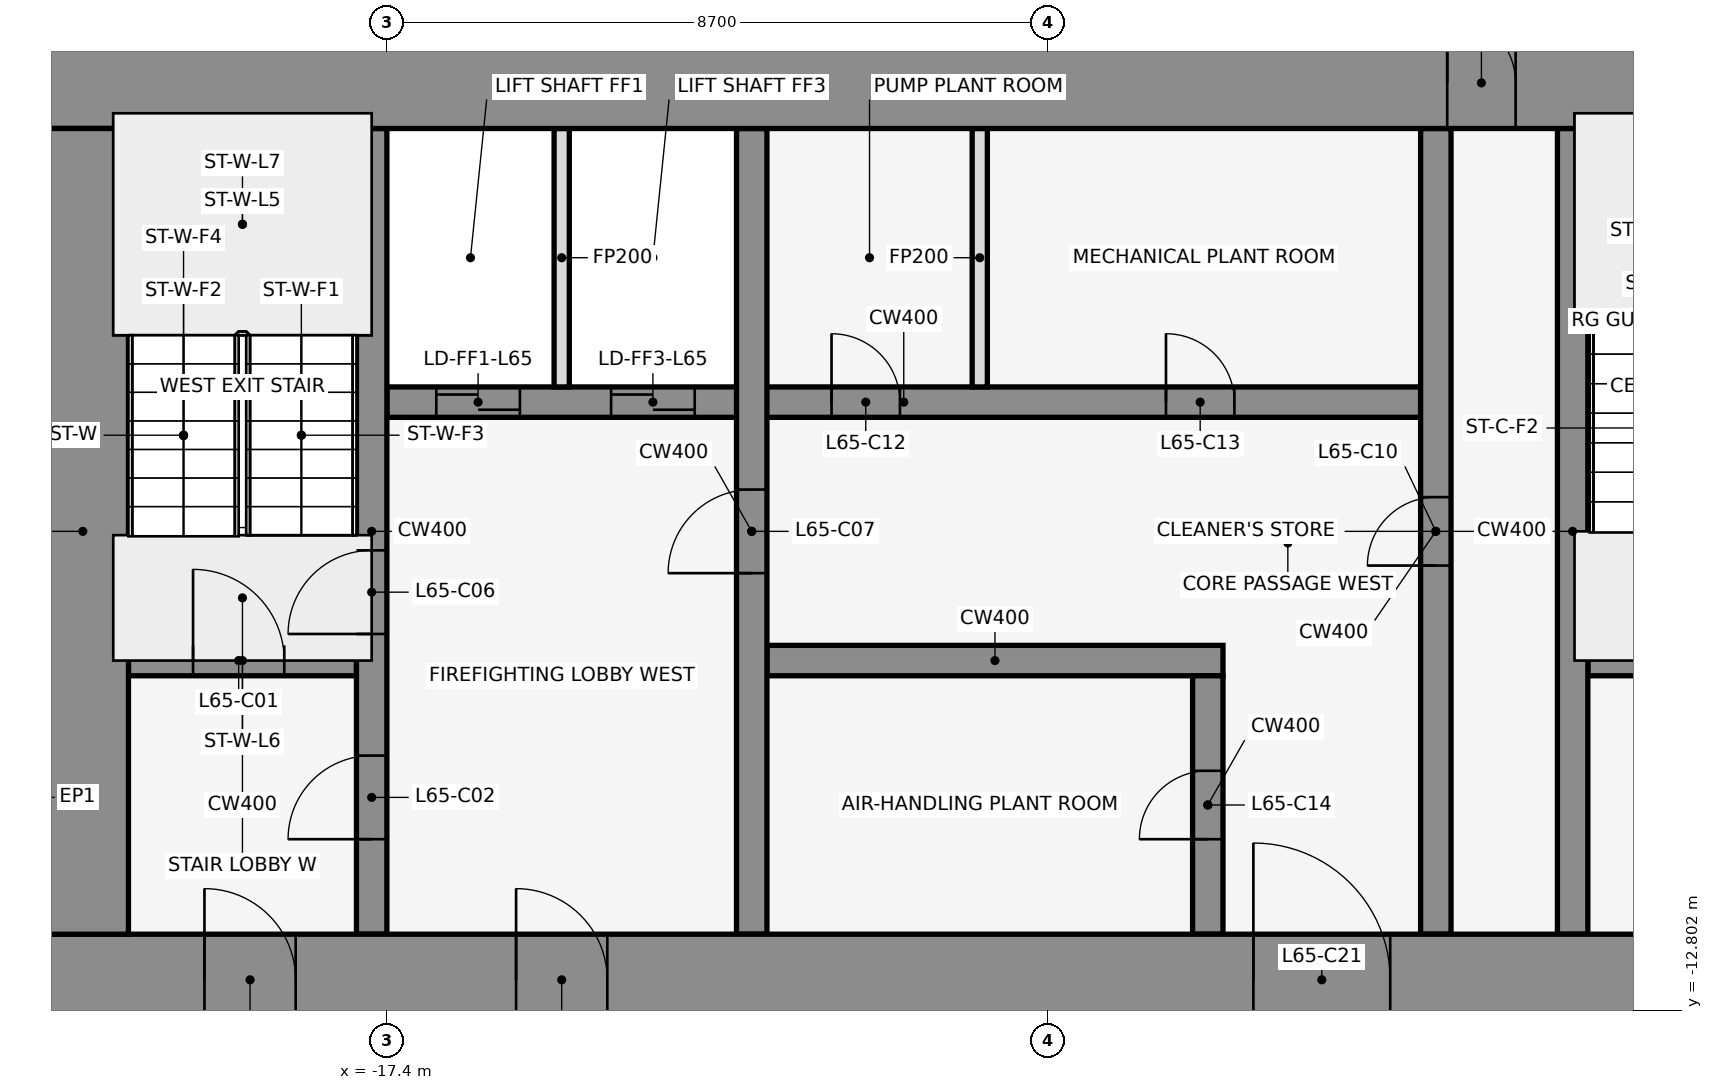
"""IFC4 building model, lengths in metres.
Left out: names, types, materials, properties, quantities, classifications, styles, units other than length and angle.
Written with IfcOpenShell. Run it as: python <this file> out.ifc"""

import sys

from ifc_helpers import new_model, si_unit, direction, frame, frame_2d, origin, place, context, subcontext, project, spatial, rectangle, extrude, element, fill, save


model = new_model("IFC4")
c1 = context("Model", 3, precision=1e-05, world=origin(), true_north=direction((0.0, 1.0)))
c2 = subcontext(c1, "Body", "Model", "MODEL_VIEW")
j1 = project(units=[si_unit("LENGTHUNIT", "METRE"), si_unit("PLANEANGLEUNIT", "RADIAN")], contexts=[c1])
p1 = place(None, origin())
s1 = spatial("IfcSite", under=j1, at=p1, CompositionType="ELEMENT")
p2 = place(p1, origin())
s2 = spatial("IfcBuilding", under=s1, at=p2, CompositionType="ELEMENT")
p3 = place(p2, frame((0.0, 0.0, 287.6)))
s3 = spatial("IfcBuildingStorey", under=s2, at=p3, CompositionType="ELEMENT", Elevation=287.6)
for number, where, z_axis, x_axis in (
    (1, (-0.068, -0.105, 0.0), (0.0, 0.0, 1.0), (-0.84, 0.543, 0.0)),
    (2, (-14.599, 1.08, 0.0), (0.0, 0.0, 1.0), (-0.84, -0.543, 0.0)),
):
    element("IfcWall", number, at=place(p3, frame(where, z_axis=z_axis, x_axis=x_axis)), inside=s3, PredefinedType="STANDARD", context=c2, shape_type="SweptSolid", body=[
        extrude(rectangle(XDim=2.183, YDim=0.25, at=frame_2d((1.091, 0.0))), origin(), (0.0, 0.0, 1.0), 5.25),
    ])
p4 = place(p3, frame((-20.8, -8.2, 0.0), z_axis=(0.0, 0.0, 1.0), x_axis=(1.0, 0.0, 0.0)))
e3 = element("IfcWall", 3, at=p4, inside=s3, PredefinedType="SHEAR", context=c2, shape_type="SweptSolid", body=[
    extrude(rectangle(XDim=3.0, YDim=0.4, at=frame_2d((1.5, 0.0))), origin(), (0.0, 0.0, 1.0), 5.4),
])
p5 = place(p4, frame((0.85, 0.0, 0.0)))
e4 = element("IfcOpeningElement", 4, at=p5, cuts=e3, PredefinedType="OPENING", context=c2, shape_type="SweptSolid", body=[
    extrude(rectangle(XDim=1.2, YDim=2.1, at=frame_2d((0.6, 1.05))), frame((0.0, 0.212, 0.0), z_axis=(0.0, -1.0, 0.0), x_axis=(1.0, 0.0, 0.0)), (0.0, 0.0, 1.0), 0.424),
])
p6 = place(p3, frame((-12.4, -8.2, 0.0), z_axis=(0.0, 0.0, 1.0), x_axis=(1.0, 0.0, 0.0)))
e5 = element("IfcWall", 5, at=p6, inside=s3, PredefinedType="SHEAR", context=c2, shape_type="SweptSolid", body=[
    extrude(rectangle(XDim=6.0, YDim=0.4, at=frame_2d((3.0, 0.0))), origin(), (0.0, 0.0, 1.0), 5.4),
])
p7 = place(p3, frame((-1.6, -8.2, 0.0), z_axis=(0.0, 0.0, 1.0), x_axis=(1.0, 0.0, 0.0)))
e6 = element("IfcWall", 6, at=p7, inside=s3, PredefinedType="SHEAR", context=c2, shape_type="SweptSolid", body=[
    extrude(rectangle(XDim=3.2, YDim=0.4, at=frame_2d((1.6, 0.0))), origin(), (0.0, 0.0, 1.0), 5.4),
])
p8 = place(p7, frame((1.05, 0.0, 0.0)))
e7 = element("IfcOpeningElement", 7, at=p8, cuts=e6, PredefinedType="OPENING", context=c2, shape_type="SweptSolid", body=[
    extrude(rectangle(XDim=1.2, YDim=2.1, at=frame_2d((0.6, 1.05))), frame((0.0, 0.212, 0.0), z_axis=(0.0, -1.0, 0.0), x_axis=(1.0, 0.0, 0.0)), (0.0, 0.0, 1.0), 0.424),
])
p9 = place(p3, frame((-17.4, -4.8, 0.0), z_axis=(0.0, 0.0, 1.0), x_axis=(1.0, 0.0, 0.0)))
e8 = element("IfcWall", 8, at=p9, inside=s3, PredefinedType="SHEAR", context=c2, shape_type="SweptSolid", body=[
    extrude(rectangle(XDim=13.6, YDim=0.4, at=frame_2d((6.8, 0.0))), origin(), (0.0, 0.0, 1.0), 5.4),
])
p10 = place(p9, frame((0.65, 0.0, 0.0)))
e9 = element("IfcOpeningElement", 9, at=p10, cuts=e8, PredefinedType="OPENING", context=c2, shape_type="SweptSolid", body=[
    extrude(rectangle(XDim=1.1, YDim=2.1, at=frame_2d((0.55, 1.05))), frame((0.0, 0.212, 0.0), z_axis=(0.0, -1.0, 0.0), x_axis=(1.0, 0.0, 0.0)), (0.0, 0.0, 1.0), 0.424),
])
p11 = place(p9, frame((2.95, 0.0, 0.0)))
e10 = element("IfcOpeningElement", 10, at=p11, cuts=e8, PredefinedType="OPENING", context=c2, shape_type="SweptSolid", body=[
    extrude(rectangle(XDim=1.1, YDim=2.1, at=frame_2d((0.55, 1.05))), frame((0.0, 0.212, 0.0), z_axis=(0.0, -1.0, 0.0), x_axis=(1.0, 0.0, 0.0)), (0.0, 0.0, 1.0), 0.424),
])
p12 = place(p9, frame((5.85, 0.0, 0.0)))
e11 = element("IfcOpeningElement", 11, at=p12, cuts=e8, PredefinedType="OPENING", context=c2, shape_type="SweptSolid", body=[
    extrude(rectangle(XDim=0.9, YDim=2.1, at=frame_2d((0.45, 1.05))), frame((0.0, 0.212, 0.0), z_axis=(0.0, -1.0, 0.0), x_axis=(1.0, 0.0, 0.0)), (0.0, 0.0, 1.0), 0.424),
])
p13 = place(p9, frame((10.25, 0.0, 0.0)))
e12 = element("IfcOpeningElement", 12, at=p13, cuts=e8, PredefinedType="OPENING", context=c2, shape_type="SweptSolid", body=[
    extrude(rectangle(XDim=0.9, YDim=2.1, at=frame_2d((0.45, 1.05))), frame((0.0, 0.212, 0.0), z_axis=(0.0, -1.0, 0.0), x_axis=(1.0, 0.0, 0.0)), (0.0, 0.0, 1.0), 0.424),
])
p14 = place(p3, frame((-17.6, -11.8, 0.0), z_axis=(0.0, 0.0, 1.0), x_axis=(0.0, 1.0, 0.0)))
e13 = element("IfcWall", 13, at=p14, inside=s3, PredefinedType="SHEAR", context=c2, shape_type="SweptSolid", body=[
    extrude(rectangle(XDim=10.6, YDim=0.4, at=frame_2d((5.3, 0.0))), origin(), (0.0, 0.0, 1.0), 5.4),
])
p15 = place(p14, frame((1.25, 0.0, 0.0)))
e14 = element("IfcOpeningElement", 14, at=p15, cuts=e13, PredefinedType="OPENING", context=c2, shape_type="SweptSolid", body=[
    extrude(rectangle(XDim=1.1, YDim=2.1, at=frame_2d((0.55, 1.05))), frame((0.0, 0.212, 0.0), z_axis=(0.0, -1.0, 0.0), x_axis=(1.0, 0.0, 0.0)), (0.0, 0.0, 1.0), 0.424),
])
p16 = place(p14, frame((3.95, 0.0, 0.0)))
e15 = element("IfcOpeningElement", 15, at=p16, cuts=e13, PredefinedType="OPENING", context=c2, shape_type="SweptSolid", body=[
    extrude(rectangle(XDim=1.1, YDim=2.1, at=frame_2d((0.55, 1.05))), frame((0.0, 0.212, 0.0), z_axis=(0.0, -1.0, 0.0), x_axis=(1.0, 0.0, 0.0)), (0.0, 0.0, 1.0), 0.424),
])
p17 = place(p3, frame((-15.1, -4.6, 0.0), z_axis=(0.0, 0.0, 1.0), x_axis=(0.0, 1.0, 0.0)))
e16 = element("IfcWall", 16, at=p17, inside=s3, PredefinedType="PARTITIONING", context=c2, shape_type="SweptSolid", body=[
    extrude(rectangle(XDim=3.4, YDim=0.2, at=frame_2d((1.7, 0.0))), origin(), (0.0, 0.0, 1.0), 4.318),
])
p18 = place(p3, frame((-12.6, -11.8, 0.0), z_axis=(0.0, 0.0, 1.0), x_axis=(0.0, 1.0, 0.0)))
e17 = element("IfcWall", 17, at=p18, inside=s3, PredefinedType="SHEAR", context=c2, shape_type="SweptSolid", body=[
    extrude(rectangle(XDim=10.6, YDim=0.4, at=frame_2d((5.3, 0.0))), origin(), (0.0, 0.0, 1.0), 5.4),
])
p19 = place(p18, frame((4.75, 0.0, 0.0)))
e18 = element("IfcOpeningElement", 18, at=p19, cuts=e17, PredefinedType="OPENING", context=c2, shape_type="SweptSolid", body=[
    extrude(rectangle(XDim=1.1, YDim=2.1, at=frame_2d((0.55, 1.05))), frame((0.0, 0.212, 0.0), z_axis=(0.0, -1.0, 0.0), x_axis=(1.0, 0.0, 0.0)), (0.0, 0.0, 1.0), 0.424),
])
p20 = place(p3, frame((-9.6, -4.6, 0.0), z_axis=(0.0, 0.0, 1.0), x_axis=(0.0, 1.0, 0.0)))
e19 = element("IfcWall", 19, at=p20, inside=s3, PredefinedType="PARTITIONING", context=c2, shape_type="SweptSolid", body=[
    extrude(rectangle(XDim=3.4, YDim=0.2, at=frame_2d((1.7, 0.0))), origin(), (0.0, 0.0, 1.0), 4.318),
])
p21 = place(p3, frame((-6.6, -11.8, 0.0), z_axis=(0.0, 0.0, 1.0), x_axis=(0.0, 1.0, 0.0)))
e20 = element("IfcWall", 20, at=p21, inside=s3, PredefinedType="SHEAR", context=c2, shape_type="SweptSolid", body=[
    extrude(rectangle(XDim=3.4, YDim=0.4, at=frame_2d((1.7, 0.0))), origin(), (0.0, 0.0, 1.0), 5.4),
])
p22 = place(p21, frame((1.25, 0.0, 0.0)))
e21 = element("IfcOpeningElement", 21, at=p22, cuts=e20, PredefinedType="OPENING", context=c2, shape_type="SweptSolid", body=[
    extrude(rectangle(XDim=0.9, YDim=2.1, at=frame_2d((0.45, 1.05))), frame((0.0, 0.212, 0.0), z_axis=(0.0, -1.0, 0.0), x_axis=(1.0, 0.0, 0.0)), (0.0, 0.0, 1.0), 0.424),
])
p23 = place(p3, frame((-3.6, -11.8, 0.0), z_axis=(0.0, 0.0, 1.0), x_axis=(0.0, 1.0, 0.0)))
e22 = element("IfcWall", 22, at=p23, inside=s3, PredefinedType="SHEAR", context=c2, shape_type="SweptSolid", body=[
    extrude(rectangle(XDim=10.6, YDim=0.4, at=frame_2d((5.3, 0.0))), origin(), (0.0, 0.0, 1.0), 5.4),
])
p24 = place(p23, frame((4.85, 0.0, 0.0)))
e23 = element("IfcOpeningElement", 23, at=p24, cuts=e22, PredefinedType="OPENING", context=c2, shape_type="SweptSolid", body=[
    extrude(rectangle(XDim=0.9, YDim=2.1, at=frame_2d((0.45, 1.05))), frame((0.0, 0.212, 0.0), z_axis=(0.0, -1.0, 0.0), x_axis=(1.0, 0.0, 0.0)), (0.0, 0.0, 1.0), 0.424),
])
p25 = place(p3, frame((-1.8, -11.8, 0.0), z_axis=(0.0, 0.0, 1.0), x_axis=(0.0, 1.0, 0.0)))
e24 = element("IfcWall", 24, at=p25, inside=s3, PredefinedType="SHEAR", context=c2, shape_type="SweptSolid", body=[
    extrude(rectangle(XDim=10.6, YDim=0.4, at=frame_2d((5.3, 0.0))), origin(), (0.0, 0.0, 1.0), 5.4),
])
p26 = place(p3, frame((-22.0, -0.6, 0.0), z_axis=(0.0, 0.0, 1.0), x_axis=(1.0, 0.0, 0.0)))
e25 = element("IfcWall", 25, at=p26, inside=s3, PredefinedType="SHEAR", context=c2, shape_type="SweptSolid", body=[
    extrude(rectangle(XDim=44.0, YDim=1.2, at=frame_2d((22.0, 0.0))), origin(), (0.0, 0.0, 1.0), 5.4),
])
p27 = place(p26, frame((18.55, 0.0, 0.0)))
e26 = element("IfcOpeningElement", 26, at=p27, cuts=e25, PredefinedType="OPENING", context=c2, shape_type="SweptSolid", body=[
    extrude(rectangle(XDim=0.9, YDim=2.1, at=frame_2d((0.45, 1.05))), frame((0.0, 0.612, 0.0), z_axis=(0.0, -1.0, 0.0), x_axis=(1.0, 0.0, 0.0)), (0.0, 0.0, 1.0), 1.224),
])
p28 = place(p26, frame((24.55, 0.0, 0.0)))
e27 = element("IfcOpeningElement", 27, at=p28, cuts=e25, PredefinedType="OPENING", context=c2, shape_type="SweptSolid", body=[
    extrude(rectangle(XDim=0.9, YDim=2.1, at=frame_2d((0.45, 1.05))), frame((0.0, 0.612, 0.0), z_axis=(0.0, -1.0, 0.0), x_axis=(1.0, 0.0, 0.0)), (0.0, 0.0, 1.0), 1.224),
])
p29 = place(p3, frame((-22.0, -12.4, 0.0), z_axis=(0.0, 0.0, 1.0), x_axis=(1.0, 0.0, 0.0)))
e28 = element("IfcWall", 28, at=p29, inside=s3, PredefinedType="SHEAR", context=c2, shape_type="SweptSolid", body=[
    extrude(rectangle(XDim=44.0, YDim=1.2, at=frame_2d((22.0, 0.0))), origin(), (0.0, 0.0, 1.0), 5.4),
])
p30 = place(p29, frame((2.2, 0.0, 0.0)))
e29 = element("IfcOpeningElement", 29, at=p30, cuts=e28, PredefinedType="OPENING", context=c2, shape_type="SweptSolid", body=[
    extrude(rectangle(XDim=1.2, YDim=2.1, at=frame_2d((0.6, 1.05))), frame((0.0, 0.612, 0.0), z_axis=(0.0, -1.0, 0.0), x_axis=(1.0, 0.0, 0.0)), (0.0, 0.0, 1.0), 1.224),
])
p31 = place(p29, frame((21.4, 0.0, 0.0)))
e30 = element("IfcOpeningElement", 30, at=p31, cuts=e28, PredefinedType="OPENING", context=c2, shape_type="SweptSolid", body=[
    extrude(rectangle(XDim=1.2, YDim=2.1, at=frame_2d((0.6, 1.05))), frame((0.0, 0.612, 0.0), z_axis=(0.0, -1.0, 0.0), x_axis=(1.0, 0.0, 0.0)), (0.0, 0.0, 1.0), 1.224),
])
p32 = place(p29, frame((40.6, 0.0, 0.0)))
e31 = element("IfcOpeningElement", 31, at=p32, cuts=e28, PredefinedType="OPENING", context=c2, shape_type="SweptSolid", body=[
    extrude(rectangle(XDim=1.2, YDim=2.1, at=frame_2d((0.6, 1.05))), frame((0.0, 0.612, 0.0), z_axis=(0.0, -1.0, 0.0), x_axis=(1.0, 0.0, 0.0)), (0.0, 0.0, 1.0), 1.224),
])
p33 = place(p29, frame((16.0, 0.0, 0.0)))
e32 = element("IfcOpeningElement", 32, at=p33, cuts=e28, PredefinedType="OPENING", context=c2, shape_type="SweptSolid", body=[
    extrude(rectangle(XDim=1.8, YDim=2.1, at=frame_2d((0.9, 1.05))), frame((0.0, 0.612, 0.0), z_axis=(0.0, -1.0, 0.0), x_axis=(1.0, 0.0, 0.0)), (0.0, 0.0, 1.0), 1.224),
])
p34 = place(p29, frame((6.3, 0.0, 0.0)))
e33 = element("IfcOpeningElement", 33, at=p34, cuts=e28, PredefinedType="OPENING", context=c2, shape_type="SweptSolid", body=[
    extrude(rectangle(XDim=1.2, YDim=2.1, at=frame_2d((0.6, 1.05))), frame((0.0, 0.612, 0.0), z_axis=(0.0, -1.0, 0.0), x_axis=(1.0, 0.0, 0.0)), (0.0, 0.0, 1.0), 1.224),
])
p35 = place(p29, frame((26.2, 0.0, 0.0)))
e34 = element("IfcOpeningElement", 34, at=p35, cuts=e28, PredefinedType="OPENING", context=c2, shape_type="SweptSolid", body=[
    extrude(rectangle(XDim=1.8, YDim=2.1, at=frame_2d((0.9, 1.05))), frame((0.0, 0.612, 0.0), z_axis=(0.0, -1.0, 0.0), x_axis=(1.0, 0.0, 0.0)), (0.0, 0.0, 1.0), 1.224),
])
p36 = place(p29, frame((36.5, 0.0, 0.0)))
e35 = element("IfcOpeningElement", 35, at=p36, cuts=e28, PredefinedType="OPENING", context=c2, shape_type="SweptSolid", body=[
    extrude(rectangle(XDim=1.2, YDim=2.1, at=frame_2d((0.6, 1.05))), frame((0.0, 0.612, 0.0), z_axis=(0.0, -1.0, 0.0), x_axis=(1.0, 0.0, 0.0)), (0.0, 0.0, 1.0), 1.224),
])
p37 = place(p3, frame((-21.4, -11.8, 0.0), z_axis=(0.0, 0.0, 1.0), x_axis=(0.0, 1.0, 0.0)))
e36 = element("IfcWall", 36, at=p37, inside=s3, PredefinedType="SHEAR", context=c2, shape_type="SweptSolid", body=[
    extrude(rectangle(XDim=10.6, YDim=1.2, at=frame_2d((5.3, 0.0))), origin(), (0.0, 0.0, 1.0), 5.4),
])
p38 = place(p5, origin())
e37 = element("IfcDoor", 37, at=p38, inside=s3, OperationType="SINGLE_SWING_LEFT", PredefinedType="DOOR", context=c2, shape_type="SweptSolid", body=[
    extrude(rectangle(XDim=1.2, YDim=2.1, at=frame_2d((0.6, 1.05))), frame((0.0, 0.025, 0.0), z_axis=(0.0, -1.0, 0.0), x_axis=(1.0, 0.0, 0.0)), (0.0, 0.0, 1.0), 0.05),
])
fill(e4, e37)
p39 = place(p15, frame((1.1, 0.0, 0.0), z_axis=(0.0, 0.0, 1.0), x_axis=(-1.0, 0.0, 0.0)))
e38 = element("IfcDoor", 38, at=p39, inside=s3, OperationType="SINGLE_SWING_LEFT", PredefinedType="DOOR", context=c2, shape_type="SweptSolid", body=[
    extrude(rectangle(XDim=1.1, YDim=2.1, at=frame_2d((0.55, 1.05))), frame((0.0, 0.025, 0.0), z_axis=(0.0, -1.0, 0.0), x_axis=(1.0, 0.0, 0.0)), (0.0, 0.0, 1.0), 0.05),
])
fill(e14, e38)
p40 = place(p10, origin())
e39 = element("IfcDoor", 39, at=p40, inside=s3, OperationType="DOUBLE_DOOR_SLIDING", PredefinedType="DOOR", context=c2, shape_type="SweptSolid", body=[
    extrude(rectangle(XDim=1.1, YDim=2.1, at=frame_2d((0.55, 1.05))), frame((0.0, 0.025, 0.0), z_axis=(0.0, -1.0, 0.0), x_axis=(1.0, 0.0, 0.0)), (0.0, 0.0, 1.0), 0.05),
])
fill(e9, e39)
p41 = place(p11, origin())
e40 = element("IfcDoor", 40, at=p41, inside=s3, OperationType="DOUBLE_DOOR_SLIDING", PredefinedType="DOOR", context=c2, shape_type="SweptSolid", body=[
    extrude(rectangle(XDim=1.1, YDim=2.1, at=frame_2d((0.55, 1.05))), frame((0.0, 0.025, 0.0), z_axis=(0.0, -1.0, 0.0), x_axis=(1.0, 0.0, 0.0)), (0.0, 0.0, 1.0), 0.05),
])
fill(e10, e40)
p42 = place(p16, frame((1.1, 0.0, 0.0), z_axis=(0.0, 0.0, 1.0), x_axis=(-1.0, 0.0, 0.0)))
e41 = element("IfcDoor", 41, at=p42, inside=s3, OperationType="SINGLE_SWING_LEFT", PredefinedType="DOOR", context=c2, shape_type="SweptSolid", body=[
    extrude(rectangle(XDim=1.1, YDim=2.1, at=frame_2d((0.55, 1.05))), frame((0.0, 0.025, 0.0), z_axis=(0.0, -1.0, 0.0), x_axis=(1.0, 0.0, 0.0)), (0.0, 0.0, 1.0), 0.05),
])
fill(e15, e41)
p43 = place(p19, origin())
e42 = element("IfcDoor", 42, at=p43, inside=s3, OperationType="SINGLE_SWING_LEFT", PredefinedType="DOOR", context=c2, shape_type="SweptSolid", body=[
    extrude(rectangle(XDim=1.1, YDim=2.1, at=frame_2d((0.55, 1.05))), frame((0.0, 0.025, 0.0), z_axis=(0.0, -1.0, 0.0), x_axis=(1.0, 0.0, 0.0)), (0.0, 0.0, 1.0), 0.05),
])
fill(e18, e42)
p44 = place(p24, frame((0.9, 0.0, 0.0), z_axis=(0.0, 0.0, 1.0), x_axis=(-1.0, 0.0, 0.0)))
e43 = element("IfcDoor", 43, at=p44, inside=s3, OperationType="SINGLE_SWING_LEFT", PredefinedType="DOOR", context=c2, shape_type="SweptSolid", body=[
    extrude(rectangle(XDim=0.9, YDim=2.1, at=frame_2d((0.45, 1.05))), frame((0.0, 0.025, 0.0), z_axis=(0.0, -1.0, 0.0), x_axis=(1.0, 0.0, 0.0)), (0.0, 0.0, 1.0), 0.05),
])
fill(e23, e43)
p45 = place(p12, origin())
e44 = element("IfcDoor", 44, at=p45, inside=s3, OperationType="SINGLE_SWING_RIGHT", PredefinedType="DOOR", context=c2, shape_type="SweptSolid", body=[
    extrude(rectangle(XDim=0.9, YDim=2.1, at=frame_2d((0.45, 1.05))), frame((0.0, 0.025, 0.0), z_axis=(0.0, -1.0, 0.0), x_axis=(1.0, 0.0, 0.0)), (0.0, 0.0, 1.0), 0.05),
])
fill(e11, e44)
p46 = place(p13, origin())
e45 = element("IfcDoor", 45, at=p46, inside=s3, OperationType="SINGLE_SWING_LEFT", PredefinedType="DOOR", context=c2, shape_type="SweptSolid", body=[
    extrude(rectangle(XDim=0.9, YDim=2.1, at=frame_2d((0.45, 1.05))), frame((0.0, 0.025, 0.0), z_axis=(0.0, -1.0, 0.0), x_axis=(1.0, 0.0, 0.0)), (0.0, 0.0, 1.0), 0.05),
])
fill(e12, e45)
p47 = place(p22, origin())
e46 = element("IfcDoor", 46, at=p47, inside=s3, OperationType="SINGLE_SWING_RIGHT", PredefinedType="DOOR", context=c2, shape_type="SweptSolid", body=[
    extrude(rectangle(XDim=0.9, YDim=2.1, at=frame_2d((0.45, 1.05))), frame((0.0, 0.025, 0.0), z_axis=(0.0, -1.0, 0.0), x_axis=(1.0, 0.0, 0.0)), (0.0, 0.0, 1.0), 0.05),
])
fill(e21, e46)
p48 = place(p27, origin())
e47 = element("IfcDoor", 47, at=p48, inside=s3, OperationType="SINGLE_SWING_LEFT", PredefinedType="DOOR", context=c2, shape_type="SweptSolid", body=[
    extrude(rectangle(XDim=0.9, YDim=2.1, at=frame_2d((0.45, 1.05))), frame((0.0, 0.025, 0.0), z_axis=(0.0, -1.0, 0.0), x_axis=(1.0, 0.0, 0.0)), (0.0, 0.0, 1.0), 0.05),
])
fill(e26, e47)
p49 = place(p30, frame((1.2, 0.0, 0.0), z_axis=(0.0, 0.0, 1.0), x_axis=(-1.0, 0.0, 0.0)))
e48 = element("IfcDoor", 48, at=p49, inside=s3, OperationType="SINGLE_SWING_RIGHT", PredefinedType="DOOR", context=c2, shape_type="SweptSolid", body=[
    extrude(rectangle(XDim=1.2, YDim=2.1, at=frame_2d((0.6, 1.05))), frame((0.0, 0.025, 0.0), z_axis=(0.0, -1.0, 0.0), x_axis=(1.0, 0.0, 0.0)), (0.0, 0.0, 1.0), 0.05),
])
fill(e29, e48)
p50 = place(p33, origin())
e49 = element("IfcDoor", 49, at=p50, inside=s3, OperationType="SINGLE_SWING_LEFT", PredefinedType="DOOR", context=c2, shape_type="SweptSolid", body=[
    extrude(rectangle(XDim=1.8, YDim=2.1, at=frame_2d((0.9, 1.05))), frame((0.0, 0.025, 0.0), z_axis=(0.0, -1.0, 0.0), x_axis=(1.0, 0.0, 0.0)), (0.0, 0.0, 1.0), 0.05),
])
fill(e32, e49)
p51 = place(p34, frame((1.2, 0.0, 0.0), z_axis=(0.0, 0.0, 1.0), x_axis=(-1.0, 0.0, 0.0)))
e50 = element("IfcDoor", 50, at=p51, inside=s3, OperationType="SINGLE_SWING_RIGHT", PredefinedType="DOOR", context=c2, shape_type="SweptSolid", body=[
    extrude(rectangle(XDim=1.2, YDim=2.1, at=frame_2d((0.6, 1.05))), frame((0.0, 0.025, 0.0), z_axis=(0.0, -1.0, 0.0), x_axis=(1.0, 0.0, 0.0)), (0.0, 0.0, 1.0), 0.05),
])
fill(e33, e50)
save(model, sys.argv[1])
